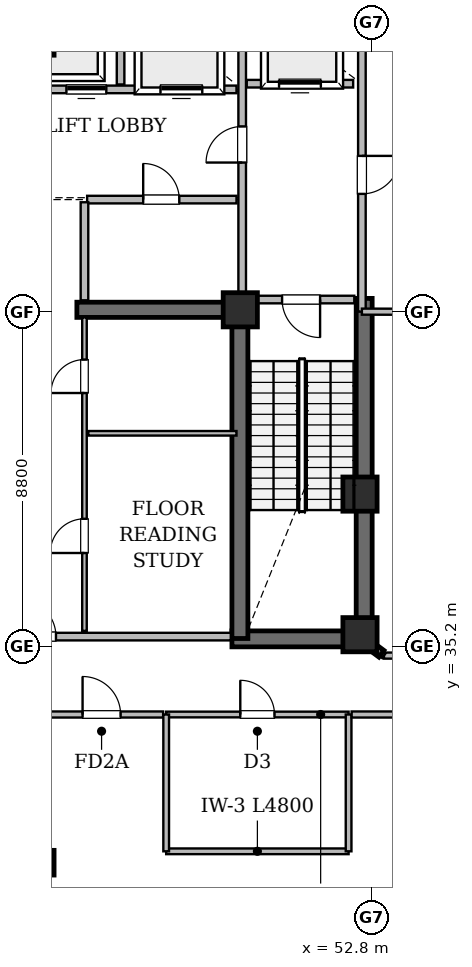
"""IFC4 building model, lengths in metres.
Left out: names, types, materials, properties, quantities, classifications, styles, units other than length and angle.
Written with IfcOpenShell. Run it as: python <this file> out.ifc"""

import sys

from ifc_helpers import new_model, si_unit, direction, frame, frame_2d, origin, origin_2d, place, context, subcontext, project, spatial, rectangle, extrude, element, fill, save


model = new_model("IFC4")
c1 = context("Model", 3, precision=1e-05, world=origin(), true_north=direction((0.0, 1.0)))
c2 = subcontext(c1, "Body", "Model", "MODEL_VIEW")
j1 = project(units=[si_unit("LENGTHUNIT", "METRE"), si_unit("PLANEANGLEUNIT", "RADIAN")], contexts=[c1])
p1 = place(None, origin())
s1 = spatial("IfcSite", under=j1, at=p1, CompositionType="ELEMENT")
p2 = place(p1, origin())
s2 = spatial("IfcBuilding", under=s1, at=p2, CompositionType="ELEMENT")
p3 = place(p2, frame((0.0, 0.0, 295.4)))
s3 = spatial("IfcBuildingStorey", under=s2, at=p3, CompositionType="ELEMENT", Elevation=295.4)
p4 = place(p3, frame((49.13, 35.39, 0.0), z_axis=(0.0, 0.0, 1.0), x_axis=(1.0, 0.0, 0.0)))
e1 = element("IfcWall", 1, at=p4, inside=s3, PredefinedType="SHEAR", context=c2, shape_type="SweptSolid", body=[
    extrude(rectangle(XDim=3.69, YDim=0.42, at=frame_2d((1.845, 0.0))), origin(), (0.0, 0.0, 1.0), 5.14),
])
p5 = place(p3, frame((52.61, 35.18, 0.0), z_axis=(0.0, 0.0, 1.0), x_axis=(0.0, 1.0, 0.0)))
e2 = element("IfcWall", 2, at=p5, inside=s3, PredefinedType="SHEAR", context=c2, shape_type="SweptSolid", body=[
    extrude(rectangle(XDim=9.17, YDim=0.42, at=frame_2d((4.585, 0.0))), origin(), (0.0, 0.0, 1.0), 5.14),
])
p6 = place(p3, frame((49.34, 35.4, 0.0), z_axis=(0.0, 0.0, 1.0), x_axis=(0.0, 1.0, 0.0)))
e3 = element("IfcWall", 3, at=p6, inside=s3, PredefinedType="SHEAR", context=c2, shape_type="SweptSolid", body=[
    extrude(rectangle(XDim=8.95, YDim=0.42, at=frame_2d((4.475, 0.0))), origin(), (0.0, 0.0, 1.0), 5.14),
])
p7 = place(p3, frame((45.05, 44.05, 0.0), z_axis=(0.0, 0.0, 1.0), x_axis=(1.0, 0.0, 0.0)))
e4 = element("IfcWall", 4, at=p7, inside=s3, PredefinedType="SHEAR", context=c2, shape_type="SweptSolid", body=[
    extrude(rectangle(XDim=4.2, YDim=0.4, at=frame_2d((2.1, 0.0))), origin(), (0.0, 0.0, 1.0), 5.14),
])
for number, where, z_axis, x_axis in (
    (5, (52.5, 35.5, 0.0), (0.0, 0.0, 1.0), (1.0, 0.0, 0.0)),
    (6, (52.5, 39.2, 0.0), (0.0, 0.0, 1.0), (1.0, 0.0, 0.0)),
    (7, (49.35, 44.05, 0.0), (0.0, 0.0, 1.0), (1.0, 0.0, 0.0)),
    (8, (44.0, 51.2, 0.0), (0.0, 0.0, 1.0), (1.0, 0.0, 0.0)),
):
    element("IfcColumn", number, at=place(p3, frame(where, z_axis=z_axis, x_axis=x_axis)), inside=s3, PredefinedType="COLUMN", context=c2, shape_type="SweptSolid", body=[
        extrude(rectangle(XDim=0.9, YDim=0.9, at=origin_2d()), origin(), (0.0, 0.0, 1.0), 5.4),
    ])
p8 = place(p3, frame((44.0, 29.5, 0.0), z_axis=(0.0, 0.0, 1.0), x_axis=(1.0, 0.0, 0.0)))
e9 = element("IfcColumn", 9, at=p8, inside=s3, PredefinedType="COLUMN", context=c2, shape_type="SweptSolid", body=[
    extrude(rectangle(XDim=0.9, YDim=0.65, at=origin_2d()), origin(), (0.0, 0.0, 1.0), 5.4),
])
p9 = place(p3, frame((38.9, 35.45, 0.0), z_axis=(0.0, 0.0, 1.0), x_axis=(1.0, 0.0, 0.0)))
e10 = element("IfcWall", 10, at=p9, inside=s3, PredefinedType="SOLIDWALL", context=c2, shape_type="SweptSolid", body=[
    extrude(rectangle(XDim=10.2, YDim=0.2, at=frame_2d((5.1, 0.0))), origin(), (0.0, 0.0, 1.0), 5.14),
])
p10 = place(p9, frame((4.6, 0.0, 0.0)))
e11 = element("IfcOpeningElement", 11, at=p10, cuts=e10, PredefinedType="OPENING", context=c2, shape_type="SweptSolid", body=[
    extrude(rectangle(XDim=1.0, YDim=2.15, at=frame_2d((0.5, 1.075))), frame((0.0, 0.11, 0.0), z_axis=(0.0, -1.0, 0.0), x_axis=(1.0, 0.0, 0.0)), (0.0, 0.0, 1.0), 0.22),
])
p11 = place(p3, frame((52.55, 44.001, 0.0), z_axis=(0.0, 0.0, 1.0), x_axis=(0.0, 1.0, 0.0)))
e12 = element("IfcWall", 12, at=p11, inside=s3, PredefinedType="SOLIDWALL", context=c2, shape_type="SweptSolid", body=[
    extrude(rectangle(XDim=8.419, YDim=0.2, at=frame_2d((4.209, 0.0))), origin(), (0.0, 0.0, 1.0), 5.14),
])
p12 = place(p11, frame((3.099, 0.0, 0.0)))
e13 = element("IfcOpeningElement", 13, at=p12, cuts=e12, PredefinedType="OPENING", context=c2, shape_type="SweptSolid", body=[
    extrude(rectangle(XDim=1.0, YDim=2.15, at=frame_2d((0.5, 1.075))), frame((0.0, 0.11, 0.0), z_axis=(0.0, -1.0, 0.0), x_axis=(1.0, 0.0, 0.0)), (0.0, 0.0, 1.0), 0.22),
])
p13 = place(p3, frame((45.25, 35.6, 0.0), z_axis=(0.0, 0.0, 1.0), x_axis=(0.0, 1.0, 0.0)))
e14 = element("IfcWall", 14, at=p13, inside=s3, PredefinedType="PARTITIONING", context=c2, shape_type="SweptSolid", body=[
    extrude(rectangle(XDim=8.25, YDim=0.12, at=frame_2d((4.125, 0.0))), origin(), (0.0, 0.0, 1.0), 5.14),
])
p14 = place(p13, frame((2.05, 0.0, 0.0)))
e15 = element("IfcOpeningElement", 15, at=p14, cuts=e14, PredefinedType="OPENING", context=c2, shape_type="SweptSolid", body=[
    extrude(rectangle(XDim=0.9, YDim=2.1, at=frame_2d((0.45, 1.05))), frame((0.0, 0.07, 0.0), z_axis=(0.0, -1.0, 0.0), x_axis=(1.0, 0.0, 0.0)), (0.0, 0.0, 1.0), 0.14),
])
p15 = place(p13, frame((6.26, 0.0, 0.0)))
e16 = element("IfcOpeningElement", 16, at=p15, cuts=e14, PredefinedType="OPENING", context=c2, shape_type="SweptSolid", body=[
    extrude(rectangle(XDim=0.88, YDim=2.1, at=frame_2d((0.44, 1.05))), frame((0.0, 0.07, 0.0), z_axis=(0.0, -1.0, 0.0), x_axis=(1.0, 0.0, 0.0)), (0.0, 0.0, 1.0), 0.14),
])
p16 = place(p3, frame((49.4, 44.5, 0.0), z_axis=(0.0, 0.0, 1.0), x_axis=(0.0, 1.0, 0.0)))
e17 = element("IfcWall", 17, at=p16, inside=s3, PredefinedType="SOLIDWALL", context=c2, shape_type="SweptSolid", body=[
    extrude(rectangle(XDim=7.92, YDim=0.2, at=frame_2d((3.96, 0.0))), origin(), (0.0, 0.0, 1.0), 4.228),
])
p17 = place(p16, frame((3.425, 0.0, 0.0)))
e18 = element("IfcOpeningElement", 18, at=p17, cuts=e17, PredefinedType="OPENING", context=c2, shape_type="SweptSolid", body=[
    extrude(rectangle(XDim=0.95, YDim=2.15, at=frame_2d((0.475, 1.075))), frame((0.0, 0.11, 0.0), z_axis=(0.0, -1.0, 0.0), x_axis=(1.0, 0.0, 0.0)), (0.0, 0.0, 1.0), 0.22),
])
p18 = place(p3, frame((44.25, 49.85, 0.0), z_axis=(0.0, 0.0, 1.0), x_axis=(1.0, 0.0, 0.0)))
e19 = element("IfcWall", 19, at=p18, inside=s3, PredefinedType="SOLIDWALL", context=c2, shape_type="SweptSolid", body=[
    extrude(rectangle(XDim=5.0, YDim=0.2, at=frame_2d((2.5, 0.0))), origin(), (0.0, 0.0, 1.0), 4.228),
])
p19 = place(p18, frame((0.525, 0.0, 0.0)))
e20 = element("IfcOpeningElement", 20, at=p19, cuts=e19, PredefinedType="OPENING", context=c2, shape_type="SweptSolid", body=[
    extrude(rectangle(XDim=1.05, YDim=2.15, at=frame_2d((0.525, 1.075))), frame((0.0, 0.11, 0.0), z_axis=(0.0, -1.0, 0.0), x_axis=(1.0, 0.0, 0.0)), (0.0, 0.0, 1.0), 0.22),
])
p20 = place(p18, frame((3.0, 0.0, 0.0)))
e21 = element("IfcOpeningElement", 21, at=p20, cuts=e19, PredefinedType="OPENING", context=c2, shape_type="SweptSolid", body=[
    extrude(rectangle(XDim=1.1, YDim=2.15, at=frame_2d((0.55, 1.075))), frame((0.0, 0.11, 0.0), z_axis=(0.0, -1.0, 0.0), x_axis=(1.0, 0.0, 0.0)), (0.0, 0.0, 1.0), 0.22),
])
p21 = place(p3, frame((47.4, 33.4, 0.0), z_axis=(0.0, 0.0, 1.0), x_axis=(1.0, 0.0, 0.0)))
e22 = element("IfcWall", 22, at=p21, inside=s3, PredefinedType="PLUMBINGWALL", context=c2, shape_type="SweptSolid", body=[
    extrude(rectangle(XDim=4.8, YDim=0.15, at=frame_2d((2.4, 0.0))), origin(), (0.0, 0.0, 1.0), 4.54),
])
p22 = place(p21, frame((1.95, 0.0, 0.0)))
e23 = element("IfcOpeningElement", 23, at=p22, cuts=e22, PredefinedType="OPENING", context=c2, shape_type="SweptSolid", body=[
    extrude(rectangle(XDim=0.9, YDim=2.1, at=frame_2d((0.45, 1.05))), frame((0.0, 0.085, 0.0), z_axis=(0.0, -1.0, 0.0), x_axis=(1.0, 0.0, 0.0)), (0.0, 0.0, 1.0), 0.17),
])
p23 = place(p3, frame((45.32, 46.95, 0.0), z_axis=(0.0, 0.0, 1.0), x_axis=(1.0, 0.0, 0.0)))
e24 = element("IfcWall", 24, at=p23, inside=s3, PredefinedType="SOLIDWALL", context=c2, shape_type="SweptSolid", body=[
    extrude(rectangle(XDim=3.93, YDim=0.2, at=frame_2d((1.965, 0.0))), origin(), (0.0, 0.0, 1.0), 4.228),
])
p24 = place(p23, frame((1.475, 0.0, 0.0)))
e25 = element("IfcOpeningElement", 25, at=p24, cuts=e24, PredefinedType="OPENING", context=c2, shape_type="SweptSolid", body=[
    extrude(rectangle(XDim=0.95, YDim=2.1, at=frame_2d((0.475, 1.05))), frame((0.0, 0.11, 0.0), z_axis=(0.0, -1.0, 0.0), x_axis=(1.0, 0.0, 0.0)), (0.0, 0.0, 1.0), 0.22),
])
p25 = place(p3, frame((44.08, 33.4, 0.0), z_axis=(0.0, 0.0, 1.0), x_axis=(1.0, 0.0, 0.0)))
e26 = element("IfcWall", 26, at=p25, inside=s3, PredefinedType="SOLIDWALL", context=c2, shape_type="SweptSolid", body=[
    extrude(rectangle(XDim=3.24, YDim=0.16, at=frame_2d((1.62, 0.0))), origin(), (0.0, 0.0, 1.0), 5.14),
])
p26 = place(p25, frame((1.12, 0.0, 0.0)))
e27 = element("IfcOpeningElement", 27, at=p26, cuts=e26, PredefinedType="OPENING", context=c2, shape_type="SweptSolid", body=[
    extrude(rectangle(XDim=1.0, YDim=2.15, at=frame_2d((0.5, 1.075))), frame((0.0, 0.09, 0.0), z_axis=(0.0, -1.0, 0.0), x_axis=(1.0, 0.0, 0.0)), (0.0, 0.0, 1.0), 0.18),
])
p27 = place(p3, frame((49.55, 44.32, 0.0), z_axis=(0.0, 0.0, 1.0), x_axis=(1.0, 0.0, 0.0)))
e28 = element("IfcWall", 28, at=p27, inside=s3, PredefinedType="SOLIDWALL", context=c2, shape_type="SweptSolid", body=[
    extrude(rectangle(XDim=2.8, YDim=0.2, at=frame_2d((1.4, 0.0))), origin(), (0.0, 0.0, 1.0), 4.228),
])
p28 = place(p27, frame((0.9, 0.0, 0.0)))
e29 = element("IfcOpeningElement", 29, at=p28, cuts=e28, PredefinedType="OPENING", context=c2, shape_type="SweptSolid", body=[
    extrude(rectangle(XDim=1.0, YDim=2.15, at=frame_2d((0.5, 1.075))), frame((0.0, 0.11, 0.0), z_axis=(0.0, -1.0, 0.0), x_axis=(1.0, 0.0, 0.0)), (0.0, 0.0, 1.0), 0.22),
])
p29 = place(p3, frame((49.52, 50.0, 0.0), z_axis=(0.0, 0.0, 1.0), x_axis=(1.0, 0.0, 0.0)))
e30 = element("IfcWall", 30, at=p29, inside=s3, PredefinedType="SOLIDWALL", context=c2, shape_type="SweptSolid", body=[
    extrude(rectangle(XDim=2.8, YDim=0.2, at=frame_2d((1.4, 0.0))), origin(), (0.0, 0.0, 1.0), 5.14),
])
p30 = place(p29, frame((0.85, 0.0, 0.0)))
e31 = element("IfcOpeningElement", 31, at=p30, cuts=e30, PredefinedType="OPENING", context=c2, shape_type="SweptSolid", body=[
    extrude(rectangle(XDim=1.1, YDim=2.15, at=frame_2d((0.55, 1.075))), frame((0.0, 0.11, 0.0), z_axis=(0.0, -1.0, 0.0), x_axis=(1.0, 0.0, 0.0)), (0.0, 0.0, 1.0), 0.22),
])
p31 = place(p3, frame((60.335, 43.985, 0.0), z_axis=(0.0, 0.0, 1.0), x_axis=(-0.999997857952, 0.002069804579, 0.0)))
e32 = element("IfcWall", 32, at=p31, inside=s3, PredefinedType="SOLIDWALL", context=c2, shape_type="SweptSolid", body=[
    extrude(rectangle(XDim=7.785, YDim=0.16, at=frame_2d((3.893, 0.0))), origin(), (0.0, 0.0, 1.0), 4.54),
])
p32 = place(p3, frame((47.4, 29.8, 0.0), z_axis=(0.0, 0.0, 1.0), x_axis=(1.0, 0.0, 0.0)))
e33 = element("IfcWall", 33, at=p32, inside=s3, PredefinedType="PLUMBINGWALL", context=c2, shape_type="SweptSolid", body=[
    extrude(rectangle(XDim=4.8, YDim=0.15, at=frame_2d((2.4, 0.0))), origin(), (0.0, 0.0, 1.0), 5.14),
])
p33 = place(p3, frame((45.35, 40.8, 0.0), z_axis=(0.0, 0.0, 1.0), x_axis=(1.0, 0.0, 0.0)))
e34 = element("IfcWall", 34, at=p33, inside=s3, PredefinedType="PARTITIONING", context=c2, shape_type="SweptSolid", body=[
    extrude(rectangle(XDim=3.9, YDim=0.12, at=frame_2d((1.95, 0.0))), origin(), (0.0, 0.0, 1.0), 5.14),
])
p34 = place(p3, frame((47.4, 33.4, 0.0), z_axis=(0.0, 0.0, 1.0), x_axis=(0.0, -1.0, 0.0)))
e35 = element("IfcWall", 35, at=p34, inside=s3, PredefinedType="PLUMBINGWALL", context=c2, shape_type="SweptSolid", body=[
    extrude(rectangle(XDim=3.6, YDim=0.15, at=frame_2d((1.8, 0.0))), origin(), (0.0, 0.0, 1.0), 4.54),
])
p35 = place(p3, frame((52.2, 29.8, 0.0), z_axis=(0.0, 0.0, 1.0), x_axis=(0.0, 1.0, 0.0)))
e36 = element("IfcWall", 36, at=p35, inside=s3, PredefinedType="PLUMBINGWALL", context=c2, shape_type="SweptSolid", body=[
    extrude(rectangle(XDim=3.6, YDim=0.15, at=frame_2d((1.8, 0.0))), origin(), (0.0, 0.0, 1.0), 5.14),
])
p36 = place(p3, frame((45.25, 44.3, 0.0), z_axis=(0.0, 0.0, 1.0), x_axis=(0.0, 1.0, 0.0)))
e37 = element("IfcWall", 37, at=p36, inside=s3, PredefinedType="SOLIDWALL", context=c2, shape_type="SweptSolid", body=[
    extrude(rectangle(XDim=2.58, YDim=0.2, at=frame_2d((1.29, 0.0))), origin(), (0.0, 0.0, 1.0), 5.14),
])
p37 = place(p3, frame((46.2, 49.98, 0.0), z_axis=(0.0, 0.0, 1.0), x_axis=(0.0, 1.0, 0.0)))
e38 = element("IfcWall", 38, at=p37, inside=s3, PredefinedType="SOLIDWALL", context=c2, shape_type="SweptSolid", body=[
    extrude(rectangle(XDim=2.37, YDim=0.2, at=frame_2d((1.185, 0.0))), origin(), (0.0, 0.0, 1.0), 5.14),
])
p38 = place(p3, frame((52.28, 33.4, 0.0), z_axis=(0.0, 0.0, 1.0), x_axis=(1.0, 0.0, 0.0)))
e39 = element("IfcWall", 39, at=p38, inside=s3, PredefinedType="SOLIDWALL", context=c2, shape_type="SweptSolid", body=[
    extrude(rectangle(XDim=2.24, YDim=0.16, at=frame_2d((1.12, 0.0))), origin(), (0.0, 0.0, 1.0), 5.14),
])
p39 = place(p3, frame((54.52, 34.95, 0.0), z_axis=(0.0, 0.0, 1.0), x_axis=(-1.0, 0.0, 0.0)))
e40 = element("IfcWall", 40, at=p39, inside=s3, PredefinedType="SOLIDWALL", context=c2, shape_type="SweptSolid", body=[
    extrude(rectangle(XDim=1.39, YDim=0.16, at=frame_2d((0.695, 0.0))), origin(), (0.0, 0.0, 1.0), 4.54),
])
p40 = place(p3, frame((53.13, 34.95, 0.0), z_axis=(0.0, 0.0, 1.0), x_axis=(-0.802951496235, 0.596044373092, 0.0)))
e41 = element("IfcWall", 41, at=p40, inside=s3, PredefinedType="SOLIDWALL", context=c2, shape_type="SweptSolid", body=[
    extrude(rectangle(XDim=0.386, YDim=0.16, at=frame_2d((0.193, 0.0))), origin(), (0.0, 0.0, 1.0), 5.14),
])
p41 = place(p28, frame((1.0, 0.0, 0.0), z_axis=(0.0, 0.0, 1.0), x_axis=(-1.0, 0.0, 0.0)))
e42 = element("IfcDoor", 42, at=p41, inside=s3, OperationType="SINGLE_SWING_RIGHT", PredefinedType="DOOR", context=c2, shape_type="SweptSolid", body=[
    extrude(rectangle(XDim=1.0, YDim=2.15, at=frame_2d((0.5, 1.075))), frame((0.0, 0.025, 0.0), z_axis=(0.0, -1.0, 0.0), x_axis=(1.0, 0.0, 0.0)), (0.0, 0.0, 1.0), 0.05),
])
fill(e29, e42)
p42 = place(p12, frame((1.0, 0.0, 0.0), z_axis=(0.0, 0.0, 1.0), x_axis=(-1.0, 0.0, 0.0)))
e43 = element("IfcDoor", 43, at=p42, inside=s3, OperationType="SINGLE_SWING_RIGHT", PredefinedType="DOOR", context=c2, shape_type="SweptSolid", body=[
    extrude(rectangle(XDim=1.0, YDim=2.15, at=frame_2d((0.5, 1.075))), frame((0.0, 0.025, 0.0), z_axis=(0.0, -1.0, 0.0), x_axis=(1.0, 0.0, 0.0)), (0.0, 0.0, 1.0), 0.05),
])
fill(e13, e43)
p43 = place(p17, origin())
e44 = element("IfcDoor", 44, at=p43, inside=s3, OperationType="SINGLE_SWING_LEFT", PredefinedType="DOOR", context=c2, shape_type="SweptSolid", body=[
    extrude(rectangle(XDim=0.95, YDim=2.15, at=frame_2d((0.475, 1.075))), frame((0.0, 0.025, 0.0), z_axis=(0.0, -1.0, 0.0), x_axis=(1.0, 0.0, 0.0)), (0.0, 0.0, 1.0), 0.05),
])
fill(e18, e44)
p44 = place(p30, origin())
e45 = element("IfcDoor", 45, at=p44, inside=s3, OperationType="SLIDING_TO_LEFT", PredefinedType="DOOR", context=c2, shape_type="SweptSolid", body=[
    extrude(rectangle(XDim=1.1, YDim=2.15, at=frame_2d((0.55, 1.075))), frame((0.0, 0.025, 0.0), z_axis=(0.0, -1.0, 0.0), x_axis=(1.0, 0.0, 0.0)), (0.0, 0.0, 1.0), 0.05),
])
fill(e31, e45)
p45 = place(p10, origin())
e46 = element("IfcDoor", 46, at=p45, inside=s3, OperationType="SINGLE_SWING_LEFT", PredefinedType="DOOR", context=c2, shape_type="SweptSolid", body=[
    extrude(rectangle(XDim=1.0, YDim=2.15, at=frame_2d((0.5, 1.075))), frame((0.0, 0.025, 0.0), z_axis=(0.0, -1.0, 0.0), x_axis=(1.0, 0.0, 0.0)), (0.0, 0.0, 1.0), 0.05),
])
fill(e11, e46)
p46 = place(p19, origin())
e47 = element("IfcDoor", 47, at=p46, inside=s3, OperationType="SLIDING_TO_LEFT", PredefinedType="DOOR", context=c2, shape_type="SweptSolid", body=[
    extrude(rectangle(XDim=1.05, YDim=2.15, at=frame_2d((0.525, 1.075))), frame((0.0, 0.025, 0.0), z_axis=(0.0, -1.0, 0.0), x_axis=(1.0, 0.0, 0.0)), (0.0, 0.0, 1.0), 0.05),
])
fill(e20, e47)
p47 = place(p20, origin())
e48 = element("IfcDoor", 48, at=p47, inside=s3, OperationType="SLIDING_TO_LEFT", PredefinedType="DOOR", context=c2, shape_type="SweptSolid", body=[
    extrude(rectangle(XDim=1.1, YDim=2.15, at=frame_2d((0.55, 1.075))), frame((0.0, 0.025, 0.0), z_axis=(0.0, -1.0, 0.0), x_axis=(1.0, 0.0, 0.0)), (0.0, 0.0, 1.0), 0.05),
])
fill(e21, e48)
p48 = place(p24, origin())
e49 = element("IfcDoor", 49, at=p48, inside=s3, OperationType="SINGLE_SWING_LEFT", PredefinedType="DOOR", context=c2, shape_type="SweptSolid", body=[
    extrude(rectangle(XDim=0.95, YDim=2.1, at=frame_2d((0.475, 1.05))), frame((0.0, 0.025, 0.0), z_axis=(0.0, -1.0, 0.0), x_axis=(1.0, 0.0, 0.0)), (0.0, 0.0, 1.0), 0.05),
])
fill(e25, e49)
p49 = place(p14, origin())
e50 = element("IfcDoor", 50, at=p49, inside=s3, OperationType="SINGLE_SWING_LEFT", PredefinedType="DOOR", context=c2, shape_type="SweptSolid", body=[
    extrude(rectangle(XDim=0.9, YDim=2.1, at=frame_2d((0.45, 1.05))), frame((0.0, 0.025, 0.0), z_axis=(0.0, -1.0, 0.0), x_axis=(1.0, 0.0, 0.0)), (0.0, 0.0, 1.0), 0.05),
])
fill(e15, e50)
p50 = place(p15, origin())
e51 = element("IfcDoor", 51, at=p50, inside=s3, OperationType="SINGLE_SWING_LEFT", PredefinedType="DOOR", context=c2, shape_type="SweptSolid", body=[
    extrude(rectangle(XDim=0.88, YDim=2.1, at=frame_2d((0.44, 1.05))), frame((0.0, 0.025, 0.0), z_axis=(0.0, -1.0, 0.0), x_axis=(1.0, 0.0, 0.0)), (0.0, 0.0, 1.0), 0.05),
])
fill(e16, e51)
p51 = place(p22, origin())
e52 = element("IfcDoor", 52, at=p51, inside=s3, OperationType="SINGLE_SWING_LEFT", PredefinedType="DOOR", context=c2, shape_type="SweptSolid", body=[
    extrude(rectangle(XDim=0.9, YDim=2.1, at=frame_2d((0.45, 1.05))), frame((0.0, 0.025, 0.0), z_axis=(0.0, -1.0, 0.0), x_axis=(1.0, 0.0, 0.0)), (0.0, 0.0, 1.0), 0.05),
])
fill(e23, e52)
p52 = place(p26, origin())
e53 = element("IfcDoor", 53, at=p52, inside=s3, OperationType="SINGLE_SWING_LEFT", PredefinedType="DOOR", context=c2, shape_type="SweptSolid", body=[
    extrude(rectangle(XDim=1.0, YDim=2.15, at=frame_2d((0.5, 1.075))), frame((0.0, 0.025, 0.0), z_axis=(0.0, -1.0, 0.0), x_axis=(1.0, 0.0, 0.0)), (0.0, 0.0, 1.0), 0.05),
])
fill(e27, e53)
save(model, sys.argv[1])
